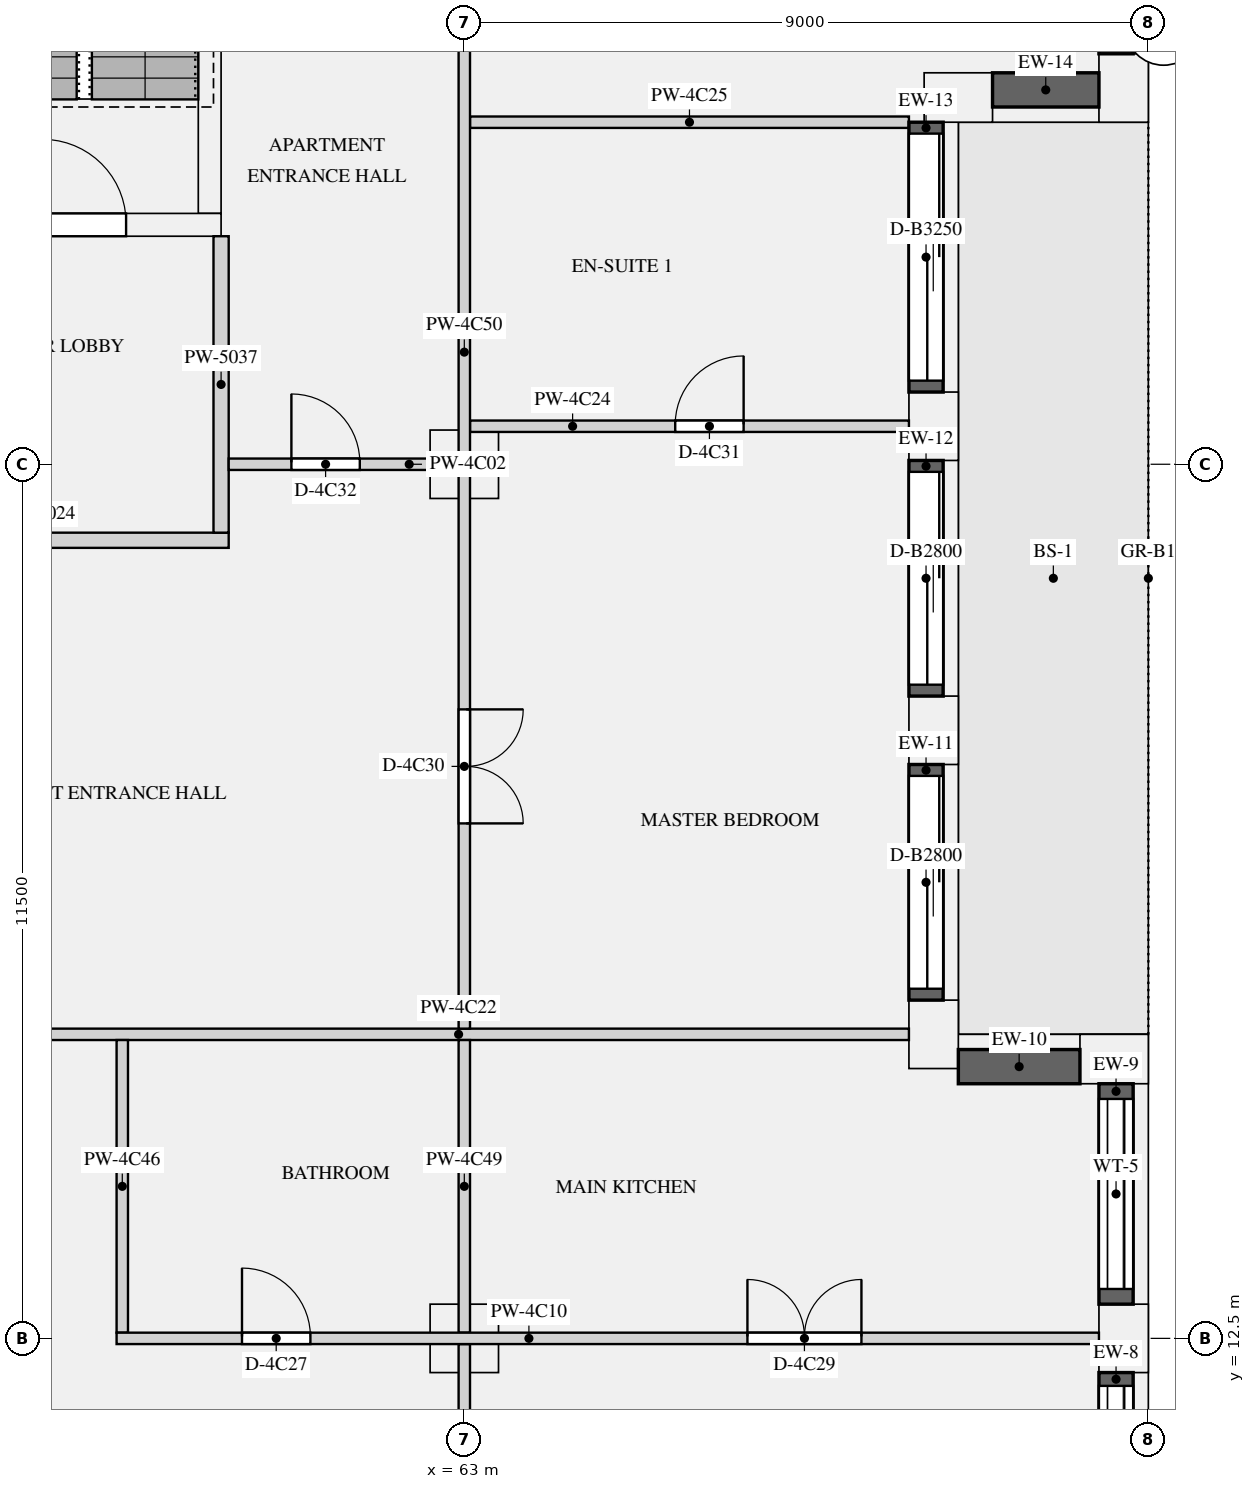
"""IFC4 building model, lengths in metres.
Left out: names, types, materials, properties, quantities, classifications, styles, units other than length and angle.
Written with IfcOpenShell. Run it as: python <this file> out.ifc"""

import sys

from ifc_helpers import new_model, si_unit, direction, frame, frame_2d, origin, origin_2d, place, context, subcontext, project, spatial, rectangle, extrude, element, fill, save


model = new_model("IFC4")
c1 = context("Model", 3, precision=1e-05, world=origin(), true_north=direction((0.0, 1.0)))
c2 = subcontext(c1, "Body", "Model", "MODEL_VIEW")
j1 = project(units=[si_unit("LENGTHUNIT", "METRE"), si_unit("PLANEANGLEUNIT", "RADIAN")], contexts=[c1])
p1 = place(None, origin())
s1 = spatial("IfcSite", under=j1, at=p1, CompositionType="ELEMENT")
p2 = place(p1, origin())
s2 = spatial("IfcBuilding", under=s1, at=p2, CompositionType="ELEMENT")
p3 = place(p2, frame((0.0, 0.0, 216.9)))
s3 = spatial("IfcBuildingStorey", under=s2, at=p3, CompositionType="ELEMENT", Elevation=216.9)
for number, where, z_axis, x_axis in (
    (1, (71.675, 12.5, 0.0), (0.0, 0.0, 1.0), (0.0, 1.0, 0.0)),
    (2, (71.55, 16.175, 0.0), (0.0, 0.0, 1.0), (-1.0, 0.0, 0.0)),
    (3, (69.175, 16.5, 0.0), (0.0, 0.0, 1.0), (0.0, 1.0, 0.0)),
    (4, (69.175, 20.5, 0.0), (0.0, 0.0, 1.0), (0.0, 1.0, 0.0)),
    (5, (69.175, 24.5, 0.0), (0.0, 0.0, 1.0), (0.0, 1.0, 0.0)),
    (6, (69.5, 28.825, 0.0), (0.0, 0.0, 1.0), (1.0, 0.0, 0.0)),
    (7, (71.675, 28.95, 0.0), (0.0, 0.0, 1.0), (0.0, 1.0, 0.0)),
):
    element("IfcColumn", number, at=place(p3, frame(where, z_axis=z_axis, x_axis=x_axis)), inside=s3, PredefinedType="USERDEFINED", context=c2, shape_type="SweptSolid", body=[
        extrude(rectangle(XDim=0.9, YDim=0.65, at=origin_2d()), origin(), (0.0, 0.0, 1.0), 3.15),
    ])
for number, where, z_axis, x_axis in (
    (8, (63.0, 24.0, 0.0), (0.0, 0.0, 1.0), (1.0, 0.0, 0.0)),
    (9, (63.0, 12.5, 0.0), (0.0, 0.0, 1.0), (1.0, 0.0, 0.0)),
):
    element("IfcColumn", number, at=place(p3, frame(where, z_axis=z_axis, x_axis=x_axis)), inside=s3, PredefinedType="COLUMN", context=c2, shape_type="SweptSolid", body=[
        extrude(rectangle(XDim=0.9, YDim=0.9, at=origin_2d()), origin(), (0.0, 0.0, 1.0), 3.15),
    ])
p4 = place(p3, frame((56.2, 27.15, 0.0), z_axis=(0.0, 0.0, 1.0), x_axis=(1.0, 0.0, 0.0)))
e10 = element("IfcWall", 10, at=p4, inside=s3, PredefinedType="SHEAR", context=c2, shape_type="SweptSolid", body=[
    extrude(rectangle(XDim=3.6, YDim=0.3, at=frame_2d((1.8, 0.0))), origin(), (0.0, 0.0, 1.0), 3.15),
])
p5 = place(p4, frame((1.25, 0.0, 0.0)))
e11 = element("IfcOpeningElement", 11, at=p5, cuts=e10, PredefinedType="OPENING", context=c2, shape_type="SweptSolid", body=[
    extrude(rectangle(XDim=1.1, YDim=2.1, at=frame_2d((0.55, 1.05))), frame((0.0, 0.16, 0.0), z_axis=(0.0, -1.0, 0.0), x_axis=(1.0, 0.0, 0.0)), (0.0, 0.0, 1.0), 0.32),
])
p6 = place(p3, frame((59.65, 27.3, 0.0), z_axis=(0.0, 0.0, 1.0), x_axis=(0.0, 1.0, 0.0)))
e12 = element("IfcWall", 12, at=p6, inside=s3, PredefinedType="SHEAR", context=c2, shape_type="SweptSolid", body=[
    extrude(rectangle(XDim=7.8, YDim=0.3, at=frame_2d((3.9, 0.0))), origin(), (0.0, 0.0, 1.0), 3.15),
])
p7 = place(p3, frame((71.575, 8.95, 0.9), z_axis=(0.0, 0.0, 1.0), x_axis=(0.0, 1.0, 0.0)))
e13 = element("IfcWall", 13, at=p7, inside=s3, PredefinedType="SOLIDWALL", context=c2, shape_type="SweptSolid", body=[
    extrude(rectangle(XDim=3.1, YDim=0.45, at=frame_2d((1.55, 0.0))), origin(), (0.0, 0.0, 1.0), 1.93),
])
p8 = place(p7, frame((0.175, 0.0, 0.15)))
e14 = element("IfcOpeningElement", 14, at=p8, cuts=e13, PredefinedType="OPENING", context=c2, shape_type="SweptSolid", body=[
    extrude(rectangle(XDim=2.75, YDim=1.5, at=frame_2d((1.375, 0.75))), frame((0.0, 0.235, 0.0), z_axis=(0.0, -1.0, 0.0), x_axis=(1.0, 0.0, 0.0)), (0.0, 0.0, 1.0), 0.47),
])
p9 = place(p3, frame((71.575, 12.95, 0.9), z_axis=(0.0, 0.0, 1.0), x_axis=(0.0, 1.0, 0.0)))
e15 = element("IfcWall", 15, at=p9, inside=s3, PredefinedType="SOLIDWALL", context=c2, shape_type="SweptSolid", body=[
    extrude(rectangle(XDim=2.9, YDim=0.45, at=frame_2d((1.45, 0.0))), origin(), (0.0, 0.0, 1.0), 1.93),
])
p10 = place(p9, frame((0.2, 0.0, 0.15)))
e16 = element("IfcOpeningElement", 16, at=p10, cuts=e15, PredefinedType="OPENING", context=c2, shape_type="SweptSolid", body=[
    extrude(rectangle(XDim=2.5, YDim=1.5, at=frame_2d((1.25, 0.75))), frame((0.0, 0.235, 0.0), z_axis=(0.0, -1.0, 0.0), x_axis=(1.0, 0.0, 0.0)), (0.0, 0.0, 1.0), 0.47),
])
p11 = place(p3, frame((71.1, 16.075, 0.9), z_axis=(0.0, 0.0, 1.0), x_axis=(-1.0, 0.0, 0.0)))
e17 = element("IfcWall", 17, at=p11, inside=s3, PredefinedType="SOLIDWALL", context=c2, shape_type="SweptSolid", body=[
    extrude(rectangle(XDim=1.6, YDim=0.45, at=frame_2d((0.8, 0.0))), origin(), (0.0, 0.0, 1.0), 1.93),
])
p12 = place(p3, frame((69.075, 16.95, 0.0), z_axis=(0.0, 0.0, 1.0), x_axis=(0.0, 1.0, 0.0)))
e18 = element("IfcWall", 18, at=p12, inside=s3, PredefinedType="SOLIDWALL", context=c2, shape_type="SweptSolid", body=[
    extrude(rectangle(XDim=3.1, YDim=0.45, at=frame_2d((1.55, 0.0))), origin(), (0.0, 0.0, 1.0), 2.83),
])
p13 = place(p12, frame((0.15, 0.0, 0.0)))
e19 = element("IfcOpeningElement", 19, at=p13, cuts=e18, PredefinedType="OPENING", context=c2, shape_type="SweptSolid", body=[
    extrude(rectangle(XDim=2.8, YDim=2.3, at=frame_2d((1.4, 1.15))), frame((0.0, 0.235, 0.0), z_axis=(0.0, -1.0, 0.0), x_axis=(1.0, 0.0, 0.0)), (0.0, 0.0, 1.0), 0.47),
])
p14 = place(p3, frame((69.075, 20.95, 0.0), z_axis=(0.0, 0.0, 1.0), x_axis=(0.0, 1.0, 0.0)))
e20 = element("IfcWall", 20, at=p14, inside=s3, PredefinedType="SOLIDWALL", context=c2, shape_type="SweptSolid", body=[
    extrude(rectangle(XDim=3.1, YDim=0.45, at=frame_2d((1.55, 0.0))), origin(), (0.0, 0.0, 1.0), 2.83),
])
p15 = place(p14, frame((0.15, 0.0, 0.0)))
e21 = element("IfcOpeningElement", 21, at=p15, cuts=e20, PredefinedType="OPENING", context=c2, shape_type="SweptSolid", body=[
    extrude(rectangle(XDim=2.8, YDim=2.3, at=frame_2d((1.4, 1.15))), frame((0.0, 0.235, 0.0), z_axis=(0.0, -1.0, 0.0), x_axis=(1.0, 0.0, 0.0)), (0.0, 0.0, 1.0), 0.47),
])
p16 = place(p3, frame((69.075, 24.95, 0.0), z_axis=(0.0, 0.0, 1.0), x_axis=(0.0, 1.0, 0.0)))
e22 = element("IfcWall", 22, at=p16, inside=s3, PredefinedType="SOLIDWALL", context=c2, shape_type="SweptSolid", body=[
    extrude(rectangle(XDim=3.55, YDim=0.45, at=frame_2d((1.775, 0.0))), origin(), (0.0, 0.0, 1.0), 2.83),
])
p17 = place(p16, frame((0.15, 0.0, 0.0)))
e23 = element("IfcOpeningElement", 23, at=p17, cuts=e22, PredefinedType="OPENING", context=c2, shape_type="SweptSolid", body=[
    extrude(rectangle(XDim=3.25, YDim=2.3, at=frame_2d((1.625, 1.15))), frame((0.0, 0.235, 0.0), z_axis=(0.0, -1.0, 0.0), x_axis=(1.0, 0.0, 0.0)), (0.0, 0.0, 1.0), 0.47),
])
p18 = place(p3, frame((69.95, 28.925, 0.9), z_axis=(0.0, 0.0, 1.0), x_axis=(1.0, 0.0, 0.0)))
e24 = element("IfcWall", 24, at=p18, inside=s3, PredefinedType="SOLIDWALL", context=c2, shape_type="SweptSolid", body=[
    extrude(rectangle(XDim=1.4, YDim=0.45, at=frame_2d((0.7, 0.0))), origin(), (0.0, 0.0, 1.0), 1.93),
])
p19 = place(p3, frame((71.575, 29.4, 0.9), z_axis=(0.0, 0.0, 1.0), x_axis=(0.0, 1.0, 0.0)))
e25 = element("IfcWall", 25, at=p19, inside=s3, PredefinedType="SOLIDWALL", context=c2, shape_type="SweptSolid", body=[
    extrude(rectangle(XDim=2.9, YDim=0.45, at=frame_2d((1.45, 0.0))), origin(), (0.0, 0.0, 1.0), 1.93),
])
p20 = place(p19, frame((0.2, 0.0, 0.15)))
e26 = element("IfcOpeningElement", 26, at=p20, cuts=e25, PredefinedType="OPENING", context=c2, shape_type="SweptSolid", body=[
    extrude(rectangle(XDim=2.5, YDim=1.5, at=frame_2d((1.25, 0.75))), frame((0.0, 0.235, 0.0), z_axis=(0.0, -1.0, 0.0), x_axis=(1.0, 0.0, 0.0)), (0.0, 0.0, 1.0), 0.47),
])
p21 = place(p3, frame((54.9, 23.0, 0.0), z_axis=(0.0, 0.0, 1.0), x_axis=(1.0, 0.0, 0.0)))
e27 = element("IfcWall", 27, at=p21, inside=s3, PredefinedType="PARTITIONING", context=c2, shape_type="SweptSolid", body=[
    extrude(rectangle(XDim=5.0, YDim=0.2, at=frame_2d((2.5, 0.0))), origin(), (0.0, 0.0, 1.0), 2.83),
])
p22 = place(p3, frame((59.8, 23.1, 0.0), z_axis=(0.0, 0.0, 1.0), x_axis=(0.0, 1.0, 0.0)))
e28 = element("IfcWall", 28, at=p22, inside=s3, PredefinedType="PARTITIONING", context=c2, shape_type="SweptSolid", body=[
    extrude(rectangle(XDim=3.9, YDim=0.2, at=frame_2d((1.95, 0.0))), origin(), (0.0, 0.0, 1.0), 2.83),
])
p23 = place(p3, frame((59.9, 24.0, 0.0), z_axis=(0.0, 0.0, 1.0), x_axis=(1.0, 0.0, 0.0)))
e29 = element("IfcWall", 29, at=p23, inside=s3, PredefinedType="PARTITIONING", context=c2, shape_type="SweptSolid", body=[
    extrude(rectangle(XDim=3.025, YDim=0.15, at=frame_2d((1.513, 0.0))), origin(), (0.0, 0.0, 1.0), 2.83),
])
p24 = place(p23, frame((0.825, 0.0, 0.0)))
e30 = element("IfcOpeningElement", 30, at=p24, cuts=e29, PredefinedType="OPENING", context=c2, shape_type="SweptSolid", body=[
    extrude(rectangle(XDim=0.9, YDim=2.1, at=frame_2d((0.45, 1.05))), frame((0.0, 0.085, 0.0), z_axis=(0.0, -1.0, 0.0), x_axis=(1.0, 0.0, 0.0)), (0.0, 0.0, 1.0), 0.17),
])
p25 = place(p3, frame((58.425, 12.5, 0.0), z_axis=(0.0, 0.0, 1.0), x_axis=(1.0, 0.0, 0.0)))
e31 = element("IfcWall", 31, at=p25, inside=s3, PredefinedType="PARTITIONING", context=c2, shape_type="SweptSolid", body=[
    extrude(rectangle(XDim=12.925, YDim=0.15, at=frame_2d((6.462, 0.0))), origin(), (0.0, 0.0, 1.0), 2.83),
])
p26 = place(p25, frame((1.65, 0.0, 0.0)))
e32 = element("IfcOpeningElement", 32, at=p26, cuts=e31, PredefinedType="OPENING", context=c2, shape_type="SweptSolid", body=[
    extrude(rectangle(XDim=0.9, YDim=2.1, at=frame_2d((0.45, 1.05))), frame((0.0, 0.085, 0.0), z_axis=(0.0, -1.0, 0.0), x_axis=(1.0, 0.0, 0.0)), (0.0, 0.0, 1.0), 0.17),
])
p27 = place(p25, frame((8.3, 0.0, 0.0)))
e33 = element("IfcOpeningElement", 33, at=p27, cuts=e31, PredefinedType="OPENING", context=c2, shape_type="SweptSolid", body=[
    extrude(rectangle(XDim=1.5, YDim=2.1, at=frame_2d((0.75, 1.05))), frame((0.0, 0.085, 0.0), z_axis=(0.0, -1.0, 0.0), x_axis=(1.0, 0.0, 0.0)), (0.0, 0.0, 1.0), 0.17),
])
p28 = place(p3, frame((54.1, 16.5, 0.0), z_axis=(0.0, 0.0, 1.0), x_axis=(1.0, 0.0, 0.0)))
e34 = element("IfcWall", 34, at=p28, inside=s3, PredefinedType="PARTITIONING", context=c2, shape_type="SweptSolid", body=[
    extrude(rectangle(XDim=14.75, YDim=0.15, at=frame_2d((7.375, 0.0))), origin(), (0.0, 0.0, 1.0), 2.83),
])
p29 = place(p28, frame((1.4, 0.0, 0.0)))
e35 = element("IfcOpeningElement", 35, at=p29, cuts=e34, PredefinedType="OPENING", context=c2, shape_type="SweptSolid", body=[
    extrude(rectangle(XDim=1.5, YDim=2.1, at=frame_2d((0.75, 1.05))), frame((0.0, 0.085, 0.0), z_axis=(0.0, -1.0, 0.0), x_axis=(1.0, 0.0, 0.0)), (0.0, 0.0, 1.0), 0.17),
])
p30 = place(p3, frame((63.075, 24.5, 0.0), z_axis=(0.0, 0.0, 1.0), x_axis=(1.0, 0.0, 0.0)))
e36 = element("IfcWall", 36, at=p30, inside=s3, PredefinedType="PARTITIONING", context=c2, shape_type="SweptSolid", body=[
    extrude(rectangle(XDim=5.775, YDim=0.15, at=frame_2d((2.888, 0.0))), origin(), (0.0, 0.0, 1.0), 2.83),
])
p31 = place(p30, frame((2.7, 0.0, 0.0)))
e37 = element("IfcOpeningElement", 37, at=p31, cuts=e36, PredefinedType="OPENING", context=c2, shape_type="SweptSolid", body=[
    extrude(rectangle(XDim=0.9, YDim=2.1, at=frame_2d((0.45, 1.05))), frame((0.0, 0.085, 0.0), z_axis=(0.0, -1.0, 0.0), x_axis=(1.0, 0.0, 0.0)), (0.0, 0.0, 1.0), 0.17),
])
p32 = place(p3, frame((63.075, 28.5, 0.0), z_axis=(0.0, 0.0, 1.0), x_axis=(1.0, 0.0, 0.0)))
e38 = element("IfcWall", 38, at=p32, inside=s3, PredefinedType="PARTITIONING", context=c2, shape_type="SweptSolid", body=[
    extrude(rectangle(XDim=5.775, YDim=0.15, at=frame_2d((2.888, 0.0))), origin(), (0.0, 0.0, 1.0), 2.83),
])
p33 = place(p3, frame((58.5, 12.575, 0.0), z_axis=(0.0, 0.0, 1.0), x_axis=(0.0, 1.0, 0.0)))
e39 = element("IfcWall", 39, at=p33, inside=s3, PredefinedType="PARTITIONING", context=c2, shape_type="SweptSolid", body=[
    extrude(rectangle(XDim=3.85, YDim=0.15, at=frame_2d((1.925, 0.0))), origin(), (0.0, 0.0, 1.0), 2.83),
])
p34 = place(p3, frame((63.0, 0.65, 0.0), z_axis=(0.0, 0.0, 1.0), x_axis=(0.0, 1.0, 0.0)))
e40 = element("IfcWall", 40, at=p34, inside=s3, PredefinedType="PARTITIONING", context=c2, shape_type="SweptSolid", body=[
    extrude(rectangle(XDim=11.775, YDim=0.15, at=frame_2d((5.888, 0.0))), origin(), (0.0, 0.0, 1.0), 2.83),
])
p35 = place(p34, frame((8.875, 0.0, 0.0)))
e41 = element("IfcOpeningElement", 41, at=p35, cuts=e40, PredefinedType="OPENING", context=c2, shape_type="SweptSolid", body=[
    extrude(rectangle(XDim=1.5, YDim=2.1, at=frame_2d((0.75, 1.05))), frame((0.0, 0.085, 0.0), z_axis=(0.0, -1.0, 0.0), x_axis=(1.0, 0.0, 0.0)), (0.0, 0.0, 1.0), 0.17),
])
p36 = place(p3, frame((63.0, 12.575, 0.0), z_axis=(0.0, 0.0, 1.0), x_axis=(0.0, 1.0, 0.0)))
e42 = element("IfcWall", 42, at=p36, inside=s3, PredefinedType="PARTITIONING", context=c2, shape_type="SweptSolid", body=[
    extrude(rectangle(XDim=3.85, YDim=0.15, at=frame_2d((1.925, 0.0))), origin(), (0.0, 0.0, 1.0), 2.83),
])
p37 = place(p3, frame((63.0, 16.575, 0.0), z_axis=(0.0, 0.0, 1.0), x_axis=(0.0, 1.0, 0.0)))
e43 = element("IfcWall", 43, at=p37, inside=s3, PredefinedType="PARTITIONING", context=c2, shape_type="SweptSolid", body=[
    extrude(rectangle(XDim=24.275, YDim=0.15, at=frame_2d((12.138, 0.0))), origin(), (0.0, 0.0, 1.0), 2.83),
])
p38 = place(p37, frame((2.7, 0.0, 0.0)))
e44 = element("IfcOpeningElement", 44, at=p38, cuts=e43, PredefinedType="OPENING", context=c2, shape_type="SweptSolid", body=[
    extrude(rectangle(XDim=1.5, YDim=2.1, at=frame_2d((0.75, 1.05))), frame((0.0, 0.085, 0.0), z_axis=(0.0, -1.0, 0.0), x_axis=(1.0, 0.0, 0.0)), (0.0, 0.0, 1.0), 0.17),
])
p39 = place(p37, frame((13.6, 0.0, 0.0)))
e45 = element("IfcOpeningElement", 45, at=p39, cuts=e43, PredefinedType="OPENING", context=c2, shape_type="SweptSolid", body=[
    extrude(rectangle(XDim=0.9, YDim=2.1, at=frame_2d((0.45, 1.05))), frame((0.0, 0.085, 0.0), z_axis=(0.0, -1.0, 0.0), x_axis=(1.0, 0.0, 0.0)), (0.0, 0.0, 1.0), 0.17),
])
p40 = place(p37, frame((16.875, 0.0, 0.0)))
e46 = element("IfcOpeningElement", 46, at=p40, cuts=e43, PredefinedType="OPENING", context=c2, shape_type="SweptSolid", body=[
    extrude(rectangle(XDim=0.9, YDim=2.1, at=frame_2d((0.45, 1.05))), frame((0.0, 0.085, 0.0), z_axis=(0.0, -1.0, 0.0), x_axis=(1.0, 0.0, 0.0)), (0.0, 0.0, 1.0), 0.17),
])
p41 = place(p8, origin())
e47 = element("IfcWindow", 47, at=p41, inside=s3, PartitioningType="SINGLE_PANEL", PredefinedType="WINDOW", context=c2, shape_type="SweptSolid", body=[
    extrude(rectangle(XDim=2.75, YDim=1.5, at=frame_2d((1.375, 0.75))), frame((0.0, -0.065, 0.0), z_axis=(0.0, -1.0, 0.0), x_axis=(1.0, 0.0, 0.0)), (0.0, 0.0, 1.0), 0.06),
])
fill(e14, e47)
p42 = place(p10, origin())
e48 = element("IfcWindow", 48, at=p42, inside=s3, PartitioningType="SINGLE_PANEL", PredefinedType="WINDOW", context=c2, shape_type="SweptSolid", body=[
    extrude(rectangle(XDim=2.5, YDim=1.5, at=frame_2d((1.25, 0.75))), frame((0.0, -0.065, 0.0), z_axis=(0.0, -1.0, 0.0), x_axis=(1.0, 0.0, 0.0)), (0.0, 0.0, 1.0), 0.06),
])
fill(e16, e48)
p43 = place(p13, origin())
e49 = element("IfcDoor", 49, at=p43, inside=s3, OperationType="SLIDING_TO_LEFT", PredefinedType="DOOR", context=c2, shape_type="SweptSolid", body=[
    extrude(rectangle(XDim=2.8, YDim=2.3, at=frame_2d((1.4, 1.15))), frame((0.0, -0.07, 0.0), z_axis=(0.0, -1.0, 0.0), x_axis=(1.0, 0.0, 0.0)), (0.0, 0.0, 1.0), 0.05),
])
fill(e19, e49)
p44 = place(p15, origin())
e50 = element("IfcDoor", 50, at=p44, inside=s3, OperationType="SLIDING_TO_LEFT", PredefinedType="DOOR", context=c2, shape_type="SweptSolid", body=[
    extrude(rectangle(XDim=2.8, YDim=2.3, at=frame_2d((1.4, 1.15))), frame((0.0, -0.07, 0.0), z_axis=(0.0, -1.0, 0.0), x_axis=(1.0, 0.0, 0.0)), (0.0, 0.0, 1.0), 0.05),
])
fill(e21, e50)
p45 = place(p17, origin())
e51 = element("IfcDoor", 51, at=p45, inside=s3, OperationType="SLIDING_TO_LEFT", PredefinedType="DOOR", context=c2, shape_type="SweptSolid", body=[
    extrude(rectangle(XDim=3.25, YDim=2.3, at=frame_2d((1.625, 1.15))), frame((0.0, -0.07, 0.0), z_axis=(0.0, -1.0, 0.0), x_axis=(1.0, 0.0, 0.0)), (0.0, 0.0, 1.0), 0.05),
])
fill(e23, e51)
p46 = place(p5, origin())
e52 = element("IfcDoor", 52, at=p46, inside=s3, OperationType="SINGLE_SWING_LEFT", PredefinedType="DOOR", context=c2, shape_type="SweptSolid", body=[
    extrude(rectangle(XDim=1.1, YDim=2.1, at=frame_2d((0.55, 1.05))), frame((0.0, 0.025, 0.0), z_axis=(0.0, -1.0, 0.0), x_axis=(1.0, 0.0, 0.0)), (0.0, 0.0, 1.0), 0.05),
])
fill(e11, e52)
p47 = place(p26, origin())
e53 = element("IfcDoor", 53, at=p47, inside=s3, OperationType="SINGLE_SWING_LEFT", PredefinedType="DOOR", context=c2, shape_type="SweptSolid", body=[
    extrude(rectangle(XDim=0.9, YDim=2.1, at=frame_2d((0.45, 1.05))), frame((0.0, 0.025, 0.0), z_axis=(0.0, -1.0, 0.0), x_axis=(1.0, 0.0, 0.0)), (0.0, 0.0, 1.0), 0.05),
])
fill(e32, e53)
p48 = place(p27, origin())
e54 = element("IfcDoor", 54, at=p48, inside=s3, OperationType="DOUBLE_DOOR_SINGLE_SWING", PredefinedType="DOOR", context=c2, shape_type="SweptSolid", body=[
    extrude(rectangle(XDim=1.5, YDim=2.1, at=frame_2d((0.75, 1.05))), frame((0.0, 0.025, 0.0), z_axis=(0.0, -1.0, 0.0), x_axis=(1.0, 0.0, 0.0)), (0.0, 0.0, 1.0), 0.05),
])
fill(e33, e54)
p49 = place(p38, frame((1.5, 0.0, 0.0), z_axis=(0.0, 0.0, 1.0), x_axis=(-1.0, 0.0, 0.0)))
e55 = element("IfcDoor", 55, at=p49, inside=s3, OperationType="DOUBLE_DOOR_SINGLE_SWING", PredefinedType="DOOR", context=c2, shape_type="SweptSolid", body=[
    extrude(rectangle(XDim=1.5, YDim=2.1, at=frame_2d((0.75, 1.05))), frame((0.0, 0.025, 0.0), z_axis=(0.0, -1.0, 0.0), x_axis=(1.0, 0.0, 0.0)), (0.0, 0.0, 1.0), 0.05),
])
fill(e44, e55)
p50 = place(p31, origin())
e56 = element("IfcDoor", 56, at=p50, inside=s3, OperationType="SINGLE_SWING_RIGHT", PredefinedType="DOOR", context=c2, shape_type="SweptSolid", body=[
    extrude(rectangle(XDim=0.9, YDim=2.1, at=frame_2d((0.45, 1.05))), frame((0.0, 0.025, 0.0), z_axis=(0.0, -1.0, 0.0), x_axis=(1.0, 0.0, 0.0)), (0.0, 0.0, 1.0), 0.05),
])
fill(e37, e56)
p51 = place(p24, origin())
e57 = element("IfcDoor", 57, at=p51, inside=s3, OperationType="SINGLE_SWING_LEFT", PredefinedType="DOOR", context=c2, shape_type="SweptSolid", body=[
    extrude(rectangle(XDim=0.9, YDim=2.1, at=frame_2d((0.45, 1.05))), frame((0.0, 0.025, 0.0), z_axis=(0.0, -1.0, 0.0), x_axis=(1.0, 0.0, 0.0)), (0.0, 0.0, 1.0), 0.05),
])
fill(e30, e57)
save(model, sys.argv[1])
